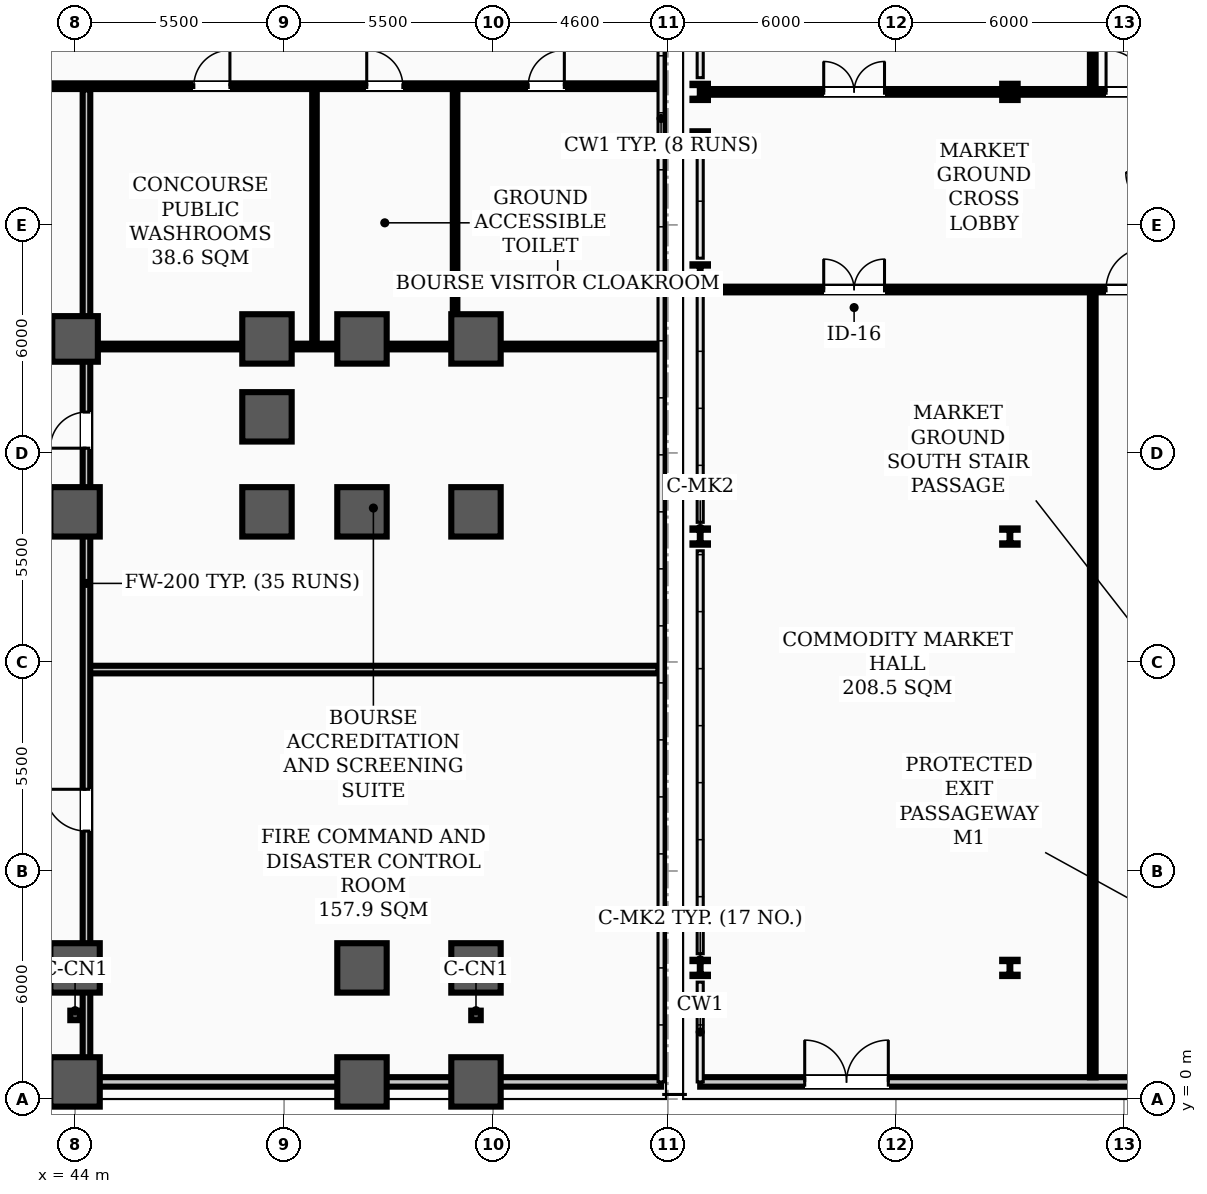
"""IFC4 building model, lengths in metres.
Left out: names, types, materials, properties, quantities, classifications, styles, units other than length and angle.
Written with IfcOpenShell. Run it as: python <this file> out.ifc"""

import sys

from ifc_helpers import new_model, si_unit, direction, frame, frame_2d, origin, origin_2d, place, context, subcontext, project, spatial, rectangle, hollow_rectangle, i_section, extrude, element, fill, save


model = new_model("IFC4")
c1 = context("Model", 3, precision=1e-05, world=origin(), true_north=direction((0.0, 1.0)))
c2 = subcontext(c1, "Body", "Model", "MODEL_VIEW")
j1 = project(units=[si_unit("LENGTHUNIT", "METRE"), si_unit("PLANEANGLEUNIT", "RADIAN")], contexts=[c1])
p1 = place(None, origin())
s1 = spatial("IfcSite", under=j1, at=p1, CompositionType="ELEMENT")
p2 = place(p1, origin())
s2 = spatial("IfcBuilding", under=s1, at=p2, CompositionType="ELEMENT")
p3 = place(p2, origin())
s3 = spatial("IfcBuildingStorey", under=s2, at=p3, CompositionType="ELEMENT", Elevation=0.0)
p4 = place(p3, frame((44.0, 20.0, 0.0), z_axis=(0.0, 0.0, 1.0), x_axis=(1.0, 0.0, 0.0)))
e1 = element("IfcColumn", 1, at=p4, inside=s3, PredefinedType="COLUMN", context=c2, shape_type="SweptSolid", body=[
    extrude(hollow_rectangle(XDim=1.2, YDim=1.2, WallThickness=0.04, InnerFilletRadius=0.02, OuterFilletRadius=0.06, at=origin_2d()), origin(), (0.0, 0.0, 1.0), 5.8),
])
for number, where, z_axis, x_axis in (
    (2, (44.0, 0.45, 0.0), (0.0, 0.0, 1.0), (1.0, 0.0, 0.0)),
    (3, (44.0, 3.45, 0.0), (0.0, 0.0, 1.0), (1.0, 0.0, 0.0)),
    (4, (44.0, 15.45, 0.0), (0.0, 0.0, 1.0), (1.0, 0.0, 0.0)),
    (5, (49.05, 15.45, 0.0), (0.0, 0.0, 1.0), (1.0, 0.0, 0.0)),
    (6, (49.05, 17.95, 0.0), (0.0, 0.0, 1.0), (1.0, 0.0, 0.0)),
    (7, (49.05, 20.0, 0.0), (0.0, 0.0, 1.0), (1.0, 0.0, 0.0)),
    (8, (51.55, 0.45, 0.0), (0.0, 0.0, 1.0), (1.0, 0.0, 0.0)),
    (9, (51.55, 3.45, 0.0), (0.0, 0.0, 1.0), (1.0, 0.0, 0.0)),
    (10, (51.55, 15.45, 0.0), (0.0, 0.0, 1.0), (1.0, 0.0, 0.0)),
    (11, (51.55, 20.0, 0.0), (0.0, 0.0, 1.0), (1.0, 0.0, 0.0)),
    (12, (54.55, 0.45, 0.0), (0.0, 0.0, 1.0), (1.0, 0.0, 0.0)),
    (13, (54.55, 3.45, 0.0), (0.0, 0.0, 1.0), (1.0, 0.0, 0.0)),
    (14, (54.55, 15.45, 0.0), (0.0, 0.0, 1.0), (1.0, 0.0, 0.0)),
    (15, (54.55, 20.0, 0.0), (0.0, 0.0, 1.0), (1.0, 0.0, 0.0)),
):
    element("IfcColumn", number, at=place(p3, frame(where, z_axis=z_axis, x_axis=x_axis)), inside=s3, PredefinedType="COLUMN", context=c2, shape_type="SweptSolid", body=[
        extrude(rectangle(XDim=1.3, YDim=1.3, at=origin_2d()), origin(), (0.0, 0.0, 1.0), 5.8),
    ])
for number, where, z_axis, x_axis in (
    (16, (44.0, 2.2, 0.0), (0.0, 0.0, 1.0), (1.0, 0.0, 0.0)),
    (17, (54.55, 2.2, 0.0), (0.0, 0.0, 1.0), (1.0, 0.0, 0.0)),
):
    element("IfcColumn", number, at=place(p3, frame(where, z_axis=z_axis, x_axis=x_axis)), inside=s3, PredefinedType="COLUMN", context=c2, shape_type="SweptSolid", body=[
        extrude(hollow_rectangle(XDim=0.25, YDim=0.25, WallThickness=0.01, InnerFilletRadius=0.01, OuterFilletRadius=0.02, at=origin_2d()), origin(), (0.0, 0.0, 1.0), 4.2),
    ])
for number, where, z_axis, x_axis in (
    (18, (60.45, 3.45, 0.0), (0.0, 0.0, 1.0), (1.0, 0.0, 0.0)),
    (19, (60.45, 14.8, 0.0), (0.0, 0.0, 1.0), (1.0, 0.0, 0.0)),
    (20, (60.45, 21.75, 0.0), (0.0, 0.0, 1.0), (1.0, 0.0, 0.0)),
    (21, (60.45, 25.25, 0.0), (0.0, 0.0, 1.0), (1.0, 0.0, 0.0)),
    (22, (60.45, 26.5, 0.0), (0.0, 0.0, 1.0), (1.0, 0.0, 0.0)),
    (23, (68.6, 3.45, 0.0), (0.0, 0.0, 1.0), (1.0, 0.0, 0.0)),
    (24, (68.6, 14.8, 0.0), (0.0, 0.0, 1.0), (1.0, 0.0, 0.0)),
    (25, (68.6, 26.5, 0.0), (0.0, 0.0, 1.0), (1.0, 0.0, 0.0)),
):
    element("IfcColumn", number, at=place(p3, frame(where, z_axis=z_axis, x_axis=x_axis)), inside=s3, PredefinedType="COLUMN", context=c2, shape_type="SweptSolid", body=[
        extrude(i_section(OverallWidth=0.407, OverallDepth=0.428, WebThickness=0.02, FlangeThickness=0.035, FilletRadius=0.022, at=origin_2d()), origin(), (0.0, 0.0, 1.0), 5.8),
    ])
p5 = place(p3, frame((0.45, 0.45, 0.0), z_axis=(0.0, 0.0, 1.0), x_axis=(1.0, 0.0, 0.0)))
e26 = element("IfcWall", 26, at=p5, inside=s3, PredefinedType="STANDARD", context=c2, shape_type="SweptSolid", body=[
    extrude(rectangle(XDim=58.97, YDim=0.25, at=frame_2d((29.485, 0.0))), origin(), (0.0, 0.0, 1.0), 4.75),
])
p6 = place(p5, frame((6.45, 0.0, 0.0)))
e27 = element("IfcOpeningElement", 27, at=p6, cuts=e26, PredefinedType="OPENING", context=c2, shape_type="SweptSolid", body=[
    extrude(rectangle(XDim=2.2, YDim=2.4, at=frame_2d((1.1, 1.2))), frame((0.0, 0.135, 0.0), z_axis=(0.0, -1.0, 0.0), x_axis=(1.0, 0.0, 0.0)), (0.0, 0.0, 1.0), 0.27),
])
p7 = place(p5, frame((17.25, 0.0, 0.0)))
e28 = element("IfcOpeningElement", 28, at=p7, cuts=e26, PredefinedType="OPENING", context=c2, shape_type="SweptSolid", body=[
    extrude(rectangle(XDim=2.2, YDim=2.4, at=frame_2d((1.1, 1.2))), frame((0.0, 0.135, 0.0), z_axis=(0.0, -1.0, 0.0), x_axis=(1.0, 0.0, 0.0)), (0.0, 0.0, 1.0), 0.27),
])
p8 = place(p5, frame((32.7, 0.0, 0.0)))
e29 = element("IfcOpeningElement", 29, at=p8, cuts=e26, PredefinedType="OPENING", context=c2, shape_type="SweptSolid", body=[
    extrude(rectangle(XDim=2.2, YDim=2.4, at=frame_2d((1.1, 1.2))), frame((0.0, 0.135, 0.0), z_axis=(0.0, -1.0, 0.0), x_axis=(1.0, 0.0, 0.0)), (0.0, 0.0, 1.0), 0.27),
])
p9 = place(p3, frame((60.45, 0.45, 0.0), z_axis=(0.0, 0.0, 1.0), x_axis=(1.0, 0.0, 0.0)))
e30 = element("IfcWall", 30, at=p9, inside=s3, PredefinedType="STANDARD", context=c2, shape_type="SweptSolid", body=[
    extrude(rectangle(XDim=16.7, YDim=0.25, at=frame_2d((8.35, 0.0))), origin(), (0.0, 0.0, 1.0), 4.75),
])
p10 = place(p9, frame((2.75, 0.0, 0.0)))
e31 = element("IfcOpeningElement", 31, at=p10, cuts=e30, PredefinedType="OPENING", context=c2, shape_type="SweptSolid", body=[
    extrude(rectangle(XDim=2.2, YDim=2.4, at=frame_2d((1.1, 1.2))), frame((0.0, 0.135, 0.0), z_axis=(0.0, -1.0, 0.0), x_axis=(1.0, 0.0, 0.0)), (0.0, 0.0, 1.0), 0.27),
])
p11 = place(p9, frame((13.17, 0.0, 0.0)))
e32 = element("IfcOpeningElement", 32, at=p11, cuts=e30, PredefinedType="OPENING", context=c2, shape_type="SweptSolid", body=[
    extrude(rectangle(XDim=2.2, YDim=2.4, at=frame_2d((1.1, 1.2))), frame((0.0, 0.135, 0.0), z_axis=(0.0, -1.0, 0.0), x_axis=(1.0, 0.0, 0.0)), (0.0, 0.0, 1.0), 0.27),
])
p12 = place(p3, frame((0.57, 26.65, 0.0), z_axis=(0.0, 0.0, 1.0), x_axis=(1.0, 0.0, 0.0)))
e33 = element("IfcWall", 33, at=p12, inside=s3, PredefinedType="PARTITIONING", context=c2, shape_type="SweptSolid", body=[
    extrude(rectangle(XDim=58.78, YDim=0.15, at=frame_2d((29.39, 0.0))), origin(), (0.0, 0.0, 1.0), 4.83),
])
p13 = place(p12, frame((17.33, 0.0, 0.0)))
e34 = element("IfcOpeningElement", 34, at=p13, cuts=e33, PredefinedType="OPENING", context=c2, shape_type="SweptSolid", body=[
    extrude(rectangle(XDim=1.8, YDim=2.08, at=frame_2d((0.9, 1.04))), frame((0.0, 0.085, 0.0), z_axis=(0.0, -1.0, 0.0), x_axis=(1.0, 0.0, 0.0)), (0.0, 0.0, 1.0), 0.17),
])
p14 = place(p12, frame((32.78, 0.0, 0.0)))
e35 = element("IfcOpeningElement", 35, at=p14, cuts=e33, PredefinedType="OPENING", context=c2, shape_type="SweptSolid", body=[
    extrude(rectangle(XDim=1.8, YDim=2.08, at=frame_2d((0.9, 1.04))), frame((0.0, 0.085, 0.0), z_axis=(0.0, -1.0, 0.0), x_axis=(1.0, 0.0, 0.0)), (0.0, 0.0, 1.0), 0.17),
])
p15 = place(p12, frame((46.555, 0.0, 0.0)))
e36 = element("IfcOpeningElement", 36, at=p15, cuts=e33, PredefinedType="OPENING", context=c2, shape_type="SweptSolid", body=[
    extrude(rectangle(XDim=0.95, YDim=2.08, at=frame_2d((0.475, 1.04))), frame((0.0, 0.085, 0.0), z_axis=(0.0, -1.0, 0.0), x_axis=(1.0, 0.0, 0.0)), (0.0, 0.0, 1.0), 0.17),
])
p16 = place(p12, frame((51.105, 0.0, 0.0)))
e37 = element("IfcOpeningElement", 37, at=p16, cuts=e33, PredefinedType="OPENING", context=c2, shape_type="SweptSolid", body=[
    extrude(rectangle(XDim=0.95, YDim=2.08, at=frame_2d((0.475, 1.04))), frame((0.0, 0.085, 0.0), z_axis=(0.0, -1.0, 0.0), x_axis=(1.0, 0.0, 0.0)), (0.0, 0.0, 1.0), 0.17),
])
p17 = place(p12, frame((55.355, 0.0, 0.0)))
e38 = element("IfcOpeningElement", 38, at=p17, cuts=e33, PredefinedType="OPENING", context=c2, shape_type="SweptSolid", body=[
    extrude(rectangle(XDim=0.95, YDim=2.08, at=frame_2d((0.475, 1.04))), frame((0.0, 0.085, 0.0), z_axis=(0.0, -1.0, 0.0), x_axis=(1.0, 0.0, 0.0)), (0.0, 0.0, 1.0), 0.17),
])
p18 = place(p3, frame((44.3, 11.3, 0.0), z_axis=(0.0, 0.0, 1.0), x_axis=(1.0, 0.0, 0.0)))
e39 = element("IfcWall", 39, at=p18, inside=s3, PredefinedType="STANDARD", context=c2, shape_type="SweptSolid", body=[
    extrude(rectangle(XDim=15.05, YDim=0.2, at=frame_2d((7.525, 0.0))), origin(), (0.0, 0.0, 1.0), 4.83),
])
p19 = place(p3, frame((44.3, 19.8, 0.0), z_axis=(0.0, 0.0, 1.0), x_axis=(1.0, 0.0, 0.0)))
e40 = element("IfcWall", 40, at=p19, inside=s3, PredefinedType="PARTITIONING", context=c2, shape_type="SweptSolid", body=[
    extrude(rectangle(XDim=15.05, YDim=0.15, at=frame_2d((7.525, 0.0))), origin(), (0.0, 0.0, 1.0), 4.73),
])
p20 = place(p3, frame((60.53, 21.3, 0.0), z_axis=(0.0, 0.0, 1.0), x_axis=(1.0, 0.0, 0.0)))
e41 = element("IfcWall", 41, at=p20, inside=s3, PredefinedType="PARTITIONING", context=c2, shape_type="SweptSolid", body=[
    extrude(rectangle(XDim=16.5, YDim=0.15, at=frame_2d((8.25, 0.0))), origin(), (0.0, 0.0, 1.0), 4.31),
])
p21 = place(p20, frame((3.17, 0.0, 0.0)))
e42 = element("IfcOpeningElement", 42, at=p21, cuts=e41, PredefinedType="OPENING", context=c2, shape_type="SweptSolid", body=[
    extrude(rectangle(XDim=1.6, YDim=2.08, at=frame_2d((0.8, 1.04))), frame((0.0, 0.085, 0.0), z_axis=(0.0, -1.0, 0.0), x_axis=(1.0, 0.0, 0.0)), (0.0, 0.0, 1.0), 0.17),
])
p22 = place(p20, frame((10.6, 0.0, 0.0)))
e43 = element("IfcOpeningElement", 43, at=p22, cuts=e41, PredefinedType="OPENING", context=c2, shape_type="SweptSolid", body=[
    extrude(rectangle(XDim=1.1, YDim=2.08, at=frame_2d((0.55, 1.04))), frame((0.0, 0.085, 0.0), z_axis=(0.0, -1.0, 0.0), x_axis=(1.0, 0.0, 0.0)), (0.0, 0.0, 1.0), 0.17),
])
p23 = place(p3, frame((60.53, 26.5, 0.0), z_axis=(0.0, 0.0, 1.0), x_axis=(1.0, 0.0, 0.0)))
e44 = element("IfcWall", 44, at=p23, inside=s3, PredefinedType="PARTITIONING", context=c2, shape_type="SweptSolid", body=[
    extrude(rectangle(XDim=16.5, YDim=0.15, at=frame_2d((8.25, 0.0))), origin(), (0.0, 0.0, 1.0), 4.96),
])
p24 = place(p23, frame((3.17, 0.0, 0.0)))
e45 = element("IfcOpeningElement", 45, at=p24, cuts=e44, PredefinedType="OPENING", context=c2, shape_type="SweptSolid", body=[
    extrude(rectangle(XDim=1.6, YDim=2.08, at=frame_2d((0.8, 1.04))), frame((0.0, 0.085, 0.0), z_axis=(0.0, -1.0, 0.0), x_axis=(1.0, 0.0, 0.0)), (0.0, 0.0, 1.0), 0.17),
])
p25 = place(p23, frame((10.6, 0.0, 0.0)))
e46 = element("IfcOpeningElement", 46, at=p25, cuts=e44, PredefinedType="OPENING", context=c2, shape_type="SweptSolid", body=[
    extrude(rectangle(XDim=1.1, YDim=2.08, at=frame_2d((0.55, 1.04))), frame((0.0, 0.085, 0.0), z_axis=(0.0, -1.0, 0.0), x_axis=(1.0, 0.0, 0.0)), (0.0, 0.0, 1.0), 0.17),
])
p26 = place(p3, frame((44.3, 0.57, 0.0), z_axis=(0.0, 0.0, 1.0), x_axis=(0.0, 1.0, 0.0)))
e47 = element("IfcWall", 47, at=p26, inside=s3, PredefinedType="STANDARD", context=c2, shape_type="SweptSolid", body=[
    extrude(rectangle(XDim=25.995, YDim=0.2, at=frame_2d((12.998, 0.0))), origin(), (0.0, 0.0, 1.0), 3.9),
])
p27 = place(p26, frame((6.48, 0.0, 0.0)))
e48 = element("IfcOpeningElement", 48, at=p27, cuts=e47, PredefinedType="OPENING", context=c2, shape_type="SweptSolid", body=[
    extrude(rectangle(XDim=1.1, YDim=2.08, at=frame_2d((0.55, 1.04))), frame((0.0, 0.11, 0.0), z_axis=(0.0, -1.0, 0.0), x_axis=(1.0, 0.0, 0.0)), (0.0, 0.0, 1.0), 0.22),
])
p28 = place(p26, frame((16.555, 0.0, 0.0)))
e49 = element("IfcOpeningElement", 49, at=p28, cuts=e47, PredefinedType="OPENING", context=c2, shape_type="SweptSolid", body=[
    extrude(rectangle(XDim=0.95, YDim=2.08, at=frame_2d((0.475, 1.04))), frame((0.0, 0.11, 0.0), z_axis=(0.0, -1.0, 0.0), x_axis=(1.0, 0.0, 0.0)), (0.0, 0.0, 1.0), 0.22),
])
for number, where, z_axis, x_axis in (
    (50, (50.3, 19.885, 0.0), (0.0, 0.0, 1.0), (0.0, 1.0, 0.0)),
    (51, (54.0, 19.885, 0.0), (0.0, 0.0, 1.0), (0.0, 1.0, 0.0)),
):
    element("IfcWall", number, at=place(p3, frame(where, z_axis=z_axis, x_axis=x_axis)), inside=s3, PredefinedType="PARTITIONING", context=c2, shape_type="SweptSolid", body=[
        extrude(rectangle(XDim=6.68, YDim=0.12, at=frame_2d((3.34, 0.0))), origin(), (0.0, 0.0, 1.0), 4.73),
    ])
p29 = place(p3, frame((70.78, 0.57, 0.0), z_axis=(0.0, 0.0, 1.0), x_axis=(0.0, 1.0, 0.0)))
e52 = element("IfcWall", 52, at=p29, inside=s3, PredefinedType="PARTITIONING", context=c2, shape_type="SweptSolid", body=[
    extrude(rectangle(XDim=20.645, YDim=0.15, at=frame_2d((10.323, 0.0))), origin(), (0.0, 0.0, 1.0), 4.96),
])
p30 = place(p3, frame((70.78, 26.585, 0.0), z_axis=(0.0, 0.0, 1.0), x_axis=(0.0, 1.0, 0.0)))
e53 = element("IfcWall", 53, at=p30, inside=s3, PredefinedType="PARTITIONING", context=c2, shape_type="SweptSolid", body=[
    extrude(rectangle(XDim=24.445, YDim=0.15, at=frame_2d((12.223, 0.0))), origin(), (0.0, 0.0, 1.0), 4.96),
])
p31 = place(p30, frame((16.815, 0.0, 0.0)))
e54 = element("IfcOpeningElement", 54, at=p31, cuts=e53, PredefinedType="OPENING", context=c2, shape_type="SweptSolid", body=[
    extrude(rectangle(XDim=1.6, YDim=2.08, at=frame_2d((0.8, 1.04))), frame((0.0, 0.085, 0.0), z_axis=(0.0, -1.0, 0.0), x_axis=(1.0, 0.0, 0.0)), (0.0, 0.0, 1.0), 0.17),
])
p32 = place(p10, frame((2.2, 0.0, 0.0), z_axis=(0.0, 0.0, 1.0), x_axis=(-1.0, 0.0, 0.0)))
e55 = element("IfcDoor", 55, at=p32, inside=s3, OperationType="DOUBLE_DOOR_SINGLE_SWING", PredefinedType="DOOR", context=c2, shape_type="SweptSolid", body=[
    extrude(rectangle(XDim=2.2, YDim=2.4, at=frame_2d((1.1, 1.2))), frame((0.0, 0.025, 0.0), z_axis=(0.0, -1.0, 0.0), x_axis=(1.0, 0.0, 0.0)), (0.0, 0.0, 1.0), 0.05),
])
fill(e31, e55)
p33 = place(p27, origin())
e56 = element("IfcDoor", 56, at=p33, inside=s3, OperationType="SINGLE_SWING_RIGHT", PredefinedType="DOOR", context=c2, shape_type="SweptSolid", body=[
    extrude(rectangle(XDim=1.1, YDim=2.08, at=frame_2d((0.55, 1.04))), frame((0.0, 0.025, 0.0), z_axis=(0.0, -1.0, 0.0), x_axis=(1.0, 0.0, 0.0)), (0.0, 0.0, 1.0), 0.05),
])
fill(e48, e56)
p34 = place(p28, origin())
e57 = element("IfcDoor", 57, at=p34, inside=s3, OperationType="SINGLE_SWING_LEFT", PredefinedType="DOOR", context=c2, shape_type="SweptSolid", body=[
    extrude(rectangle(XDim=0.95, YDim=2.08, at=frame_2d((0.475, 1.04))), frame((0.0, 0.025, 0.0), z_axis=(0.0, -1.0, 0.0), x_axis=(1.0, 0.0, 0.0)), (0.0, 0.0, 1.0), 0.05),
])
fill(e49, e57)
p35 = place(p15, origin())
e58 = element("IfcDoor", 58, at=p35, inside=s3, OperationType="SINGLE_SWING_RIGHT", PredefinedType="DOOR", context=c2, shape_type="SweptSolid", body=[
    extrude(rectangle(XDim=0.95, YDim=2.08, at=frame_2d((0.475, 1.04))), frame((0.0, 0.025, 0.0), z_axis=(0.0, -1.0, 0.0), x_axis=(1.0, 0.0, 0.0)), (0.0, 0.0, 1.0), 0.05),
])
fill(e36, e58)
p36 = place(p16, origin())
e59 = element("IfcDoor", 59, at=p36, inside=s3, OperationType="SINGLE_SWING_LEFT", PredefinedType="DOOR", context=c2, shape_type="SweptSolid", body=[
    extrude(rectangle(XDim=0.95, YDim=2.08, at=frame_2d((0.475, 1.04))), frame((0.0, 0.025, 0.0), z_axis=(0.0, -1.0, 0.0), x_axis=(1.0, 0.0, 0.0)), (0.0, 0.0, 1.0), 0.05),
])
fill(e37, e59)
p37 = place(p17, origin())
e60 = element("IfcDoor", 60, at=p37, inside=s3, OperationType="SINGLE_SWING_RIGHT", PredefinedType="DOOR", context=c2, shape_type="SweptSolid", body=[
    extrude(rectangle(XDim=0.95, YDim=2.08, at=frame_2d((0.475, 1.04))), frame((0.0, 0.025, 0.0), z_axis=(0.0, -1.0, 0.0), x_axis=(1.0, 0.0, 0.0)), (0.0, 0.0, 1.0), 0.05),
])
fill(e38, e60)
p38 = place(p21, origin())
e61 = element("IfcDoor", 61, at=p38, inside=s3, OperationType="DOUBLE_DOOR_SINGLE_SWING", PredefinedType="DOOR", context=c2, shape_type="SweptSolid", body=[
    extrude(rectangle(XDim=1.6, YDim=2.08, at=frame_2d((0.8, 1.04))), frame((0.0, 0.025, 0.0), z_axis=(0.0, -1.0, 0.0), x_axis=(1.0, 0.0, 0.0)), (0.0, 0.0, 1.0), 0.05),
])
fill(e42, e61)
p39 = place(p24, origin())
e62 = element("IfcDoor", 62, at=p39, inside=s3, OperationType="DOUBLE_DOOR_SINGLE_SWING", PredefinedType="DOOR", context=c2, shape_type="SweptSolid", body=[
    extrude(rectangle(XDim=1.6, YDim=2.08, at=frame_2d((0.8, 1.04))), frame((0.0, 0.025, 0.0), z_axis=(0.0, -1.0, 0.0), x_axis=(1.0, 0.0, 0.0)), (0.0, 0.0, 1.0), 0.05),
])
fill(e45, e62)
p40 = place(p22, origin())
e63 = element("IfcDoor", 63, at=p40, inside=s3, OperationType="SINGLE_SWING_RIGHT", PredefinedType="DOOR", context=c2, shape_type="SweptSolid", body=[
    extrude(rectangle(XDim=1.1, YDim=2.08, at=frame_2d((0.55, 1.04))), frame((0.0, 0.025, 0.0), z_axis=(0.0, -1.0, 0.0), x_axis=(1.0, 0.0, 0.0)), (0.0, 0.0, 1.0), 0.05),
])
fill(e43, e63)
p41 = place(p25, origin())
e64 = element("IfcDoor", 64, at=p41, inside=s3, OperationType="SINGLE_SWING_LEFT", PredefinedType="DOOR", context=c2, shape_type="SweptSolid", body=[
    extrude(rectangle(XDim=1.1, YDim=2.08, at=frame_2d((0.55, 1.04))), frame((0.0, 0.025, 0.0), z_axis=(0.0, -1.0, 0.0), x_axis=(1.0, 0.0, 0.0)), (0.0, 0.0, 1.0), 0.05),
])
fill(e46, e64)
save(model, sys.argv[1])
